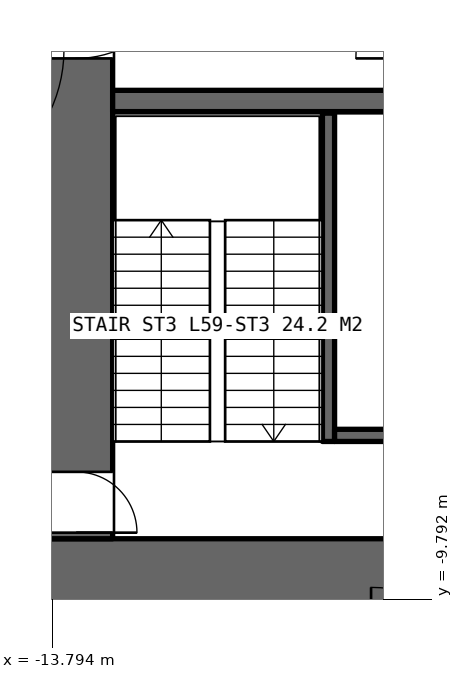
"""IFC4 building model, lengths in metres.
Left out: names, types, materials, properties, quantities, classifications, styles, units other than length and angle.
Written with IfcOpenShell. Run it as: python <this file> out.ifc"""

import sys

from ifc_helpers import new_model, si_unit, direction, frame, frame_2d, origin, place, context, subcontext, project, spatial, rectangle, extrude, element, fill, save


model = new_model("IFC4")
c1 = context("Model", 3, precision=1e-05, world=origin(), true_north=direction((0.0, 1.0)))
c2 = subcontext(c1, "Body", "Model", "MODEL_VIEW")
j1 = project(units=[si_unit("LENGTHUNIT", "METRE"), si_unit("PLANEANGLEUNIT", "RADIAN")], contexts=[c1])
p1 = place(None, origin())
s1 = spatial("IfcSite", under=j1, at=p1, CompositionType="ELEMENT")
p2 = place(p1, origin())
s2 = spatial("IfcBuilding", under=s1, at=p2, CompositionType="ELEMENT")
p3 = place(p2, frame((0.0, 0.0, 266.2)))
s3 = spatial("IfcBuildingStorey", under=s2, at=p3, CompositionType="ELEMENT", Elevation=266.2)
p4 = place(p3, frame((-14.0, -9.4, 0.0), z_axis=(0.0, 0.0, 1.0), x_axis=(1.0, 0.0, 0.0)))
e1 = element("IfcWall", 1, at=p4, inside=s3, PredefinedType="SHEAR", context=c2, shape_type="SweptSolid", body=[
    extrude(rectangle(XDim=28.0, YDim=1.2, at=frame_2d((14.0, 0.0))), origin(), (0.0, 0.0, 1.0), 5.0),
])
p5 = place(p4, frame((22.9, 0.0, 0.0)))
e2 = element("IfcOpeningElement", 2, at=p5, cuts=e1, PredefinedType="OPENING", context=c2, shape_type="SweptSolid", body=[
    extrude(rectangle(XDim=2.2, YDim=2.7, at=frame_2d((1.1, 1.35))), frame((0.0, 0.61, 0.0), z_axis=(0.0, -1.0, 0.0), x_axis=(1.0, 0.0, 0.0)), (0.0, 0.0, 1.0), 1.22),
])
p6 = place(p3, frame((-13.4, 8.8, 0.0), z_axis=(0.0, 0.0, 1.0), x_axis=(0.0, -1.0, 0.0)))
e3 = element("IfcWall", 3, at=p6, inside=s3, PredefinedType="SHEAR", context=c2, shape_type="SweptSolid", body=[
    extrude(rectangle(XDim=17.6, YDim=1.2, at=frame_2d((8.8, 0.0))), origin(), (0.0, 0.0, 1.0), 5.0),
])
p7 = place(p6, frame((7.9, 0.0, 0.0)))
e4 = element("IfcOpeningElement", 4, at=p7, cuts=e3, PredefinedType="OPENING", context=c2, shape_type="SweptSolid", body=[
    extrude(rectangle(XDim=1.8, YDim=2.4, at=frame_2d((0.9, 1.2))), frame((0.0, 0.61, 0.0), z_axis=(0.0, -1.0, 0.0), x_axis=(1.0, 0.0, 0.0)), (0.0, 0.0, 1.0), 1.22),
])
p8 = place(p6, frame((16.5, 0.0, 0.0)))
e5 = element("IfcOpeningElement", 5, at=p8, cuts=e3, PredefinedType="OPENING", context=c2, shape_type="SweptSolid", body=[
    extrude(rectangle(XDim=1.0, YDim=2.4, at=frame_2d((0.5, 1.2))), frame((0.0, 0.61, 0.0), z_axis=(0.0, -1.0, 0.0), x_axis=(1.0, 0.0, 0.0)), (0.0, 0.0, 1.0), 1.22),
])
p9 = place(p3, frame((-12.8, -1.6, 0.0), z_axis=(0.0, 0.0, 1.0), x_axis=(1.0, 0.0, 0.0)))
e6 = element("IfcWall", 6, at=p9, inside=s3, PredefinedType="SHEAR", context=c2, shape_type="SweptSolid", body=[
    extrude(rectangle(XDim=5.6, YDim=0.35, at=frame_2d((2.8, 0.0))), origin(), (0.0, 0.0, 1.0), 5.0),
])
p10 = place(p3, frame((-9.25, -7.2, 0.0), z_axis=(0.0, 0.0, 1.0), x_axis=(0.0, 1.0, 0.0)))
e7 = element("IfcWall", 7, at=p10, inside=s3, PredefinedType="SOLIDWALL", context=c2, shape_type="SweptSolid", body=[
    extrude(rectangle(XDim=5.4, YDim=0.2, at=frame_2d((2.7, 0.0))), origin(), (0.0, 0.0, 1.0), 5.0),
])
p11 = place(p3, frame((-9.15, -7.1, 0.0), z_axis=(0.0, 0.0, 1.0), x_axis=(1.0, 0.0, 0.0)))
e8 = element("IfcWall", 8, at=p11, inside=s3, PredefinedType="SOLIDWALL", context=c2, shape_type="SweptSolid", body=[
    extrude(rectangle(XDim=1.95, YDim=0.2, at=frame_2d((0.975, 0.0))), origin(), (0.0, 0.0, 1.0), 5.0),
])
p12 = place(p7, origin())
e9 = element("IfcDoor", 9, at=p12, inside=s3, OperationType="DOUBLE_DOOR_SINGLE_SWING", PredefinedType="DOOR", context=c2, shape_type="SweptSolid", body=[
    extrude(rectangle(XDim=1.8, YDim=2.4, at=frame_2d((0.9, 1.2))), frame((0.0, 0.025, 0.0), z_axis=(0.0, -1.0, 0.0), x_axis=(1.0, 0.0, 0.0)), (0.0, 0.0, 1.0), 0.05),
])
fill(e4, e9)
p13 = place(p8, origin())
e10 = element("IfcDoor", 10, at=p13, inside=s3, OperationType="SINGLE_SWING_RIGHT", PredefinedType="DOOR", context=c2, shape_type="SweptSolid", body=[
    extrude(rectangle(XDim=1.0, YDim=2.4, at=frame_2d((0.5, 1.2))), frame((0.0, 0.025, 0.0), z_axis=(0.0, -1.0, 0.0), x_axis=(1.0, 0.0, 0.0)), (0.0, 0.0, 1.0), 0.05),
])
fill(e5, e10)
save(model, sys.argv[1])
